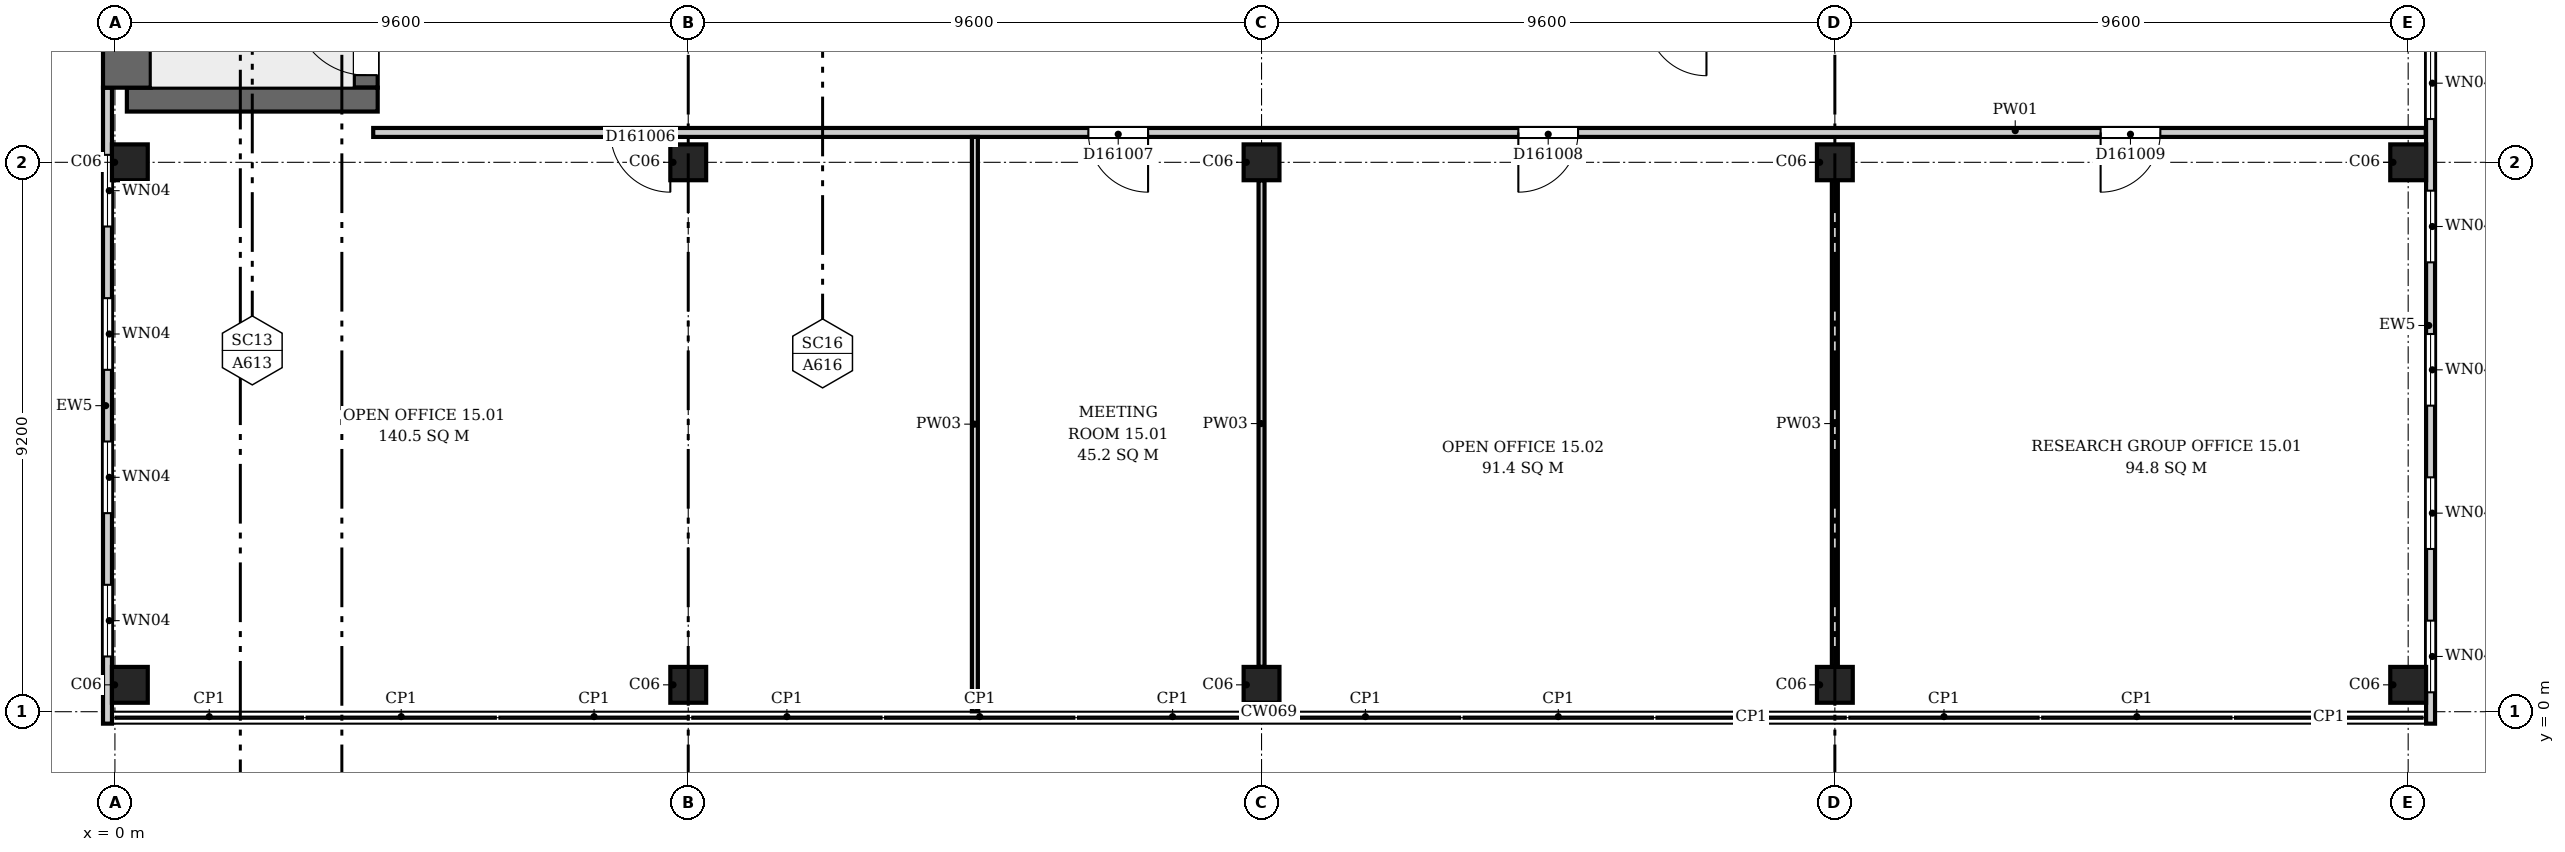
"""IFC4 building model, lengths in metres.
Left out: names, types, materials, properties, quantities, classifications, styles, units other than length and angle.
Written with IfcOpenShell. Run it as: python <this file> out.ifc"""

import sys

from ifc_helpers import new_model, si_unit, direction, frame, frame_2d, origin, origin_2d, place, context, subcontext, project, spatial, rectangle, extrude, element, fill, save


model = new_model("IFC4")
c1 = context("Model", 3, precision=1e-05, world=origin(), true_north=direction((0.0, 1.0)))
c2 = subcontext(c1, "Body", "Model", "MODEL_VIEW")
j1 = project(units=[si_unit("LENGTHUNIT", "METRE"), si_unit("PLANEANGLEUNIT", "RADIAN")], contexts=[c1])
p1 = place(None, origin())
s1 = spatial("IfcSite", under=j1, at=p1, CompositionType="ELEMENT")
p2 = place(p1, origin())
s2 = spatial("IfcBuilding", under=s1, at=p2, CompositionType="ELEMENT")
p3 = place(p2, frame((0.0, 0.0, 73.9)))
s3 = spatial("IfcBuildingStorey", under=s2, at=p3, CompositionType="ELEMENT", Elevation=73.9)
p4 = place(p3, frame((0.2, 10.25, 0.0), z_axis=(0.0, 0.0, 1.0), x_axis=(1.0, 0.0, 0.0)))
e1 = element("IfcWall", 1, at=p4, inside=s3, PredefinedType="SHEAR", context=c2, shape_type="SweptSolid", body=[
    extrude(rectangle(XDim=4.2, YDim=0.4, at=frame_2d((2.1, 0.0))), origin(), (0.0, 0.0, 1.0), 4.2),
])
p5 = place(p3, frame((0.2, 10.45, 0.0), z_axis=(0.0, 0.0, 1.0), x_axis=(0.0, 1.0, 0.0)))
e2 = element("IfcWall", 2, at=p5, inside=s3, PredefinedType="SHEAR", context=c2, shape_type="SweptSolid", body=[
    extrude(rectangle(XDim=6.6, YDim=0.8, at=frame_2d((3.3, 0.0))), origin(), (0.0, 0.0, 1.0), 4.2),
])
p6 = place(p3, frame((4.2, 10.45, 0.0), z_axis=(0.0, 0.0, 1.0), x_axis=(0.0, 1.0, 0.0)))
e3 = element("IfcWall", 3, at=p6, inside=s3, PredefinedType="SHEAR", context=c2, shape_type="SweptSolid", body=[
    extrude(rectangle(XDim=6.6, YDim=0.4, at=frame_2d((3.3, 0.0))), origin(), (0.0, 0.0, 1.0), 4.2),
])
p7 = place(p6, frame((0.21, 0.0, 0.0)))
e4 = element("IfcOpeningElement", 4, at=p7, cuts=e3, PredefinedType="OPENING", context=c2, shape_type="SweptSolid", body=[
    extrude(rectangle(XDim=1.2, YDim=2.1, at=frame_2d((0.6, 1.05))), frame((0.0, 0.21, 0.0), z_axis=(0.0, -1.0, 0.0), x_axis=(1.0, 0.0, 0.0)), (0.0, 0.0, 1.0), 0.42),
])
for number, where, z_axis, x_axis in (
    (5, (0.25, 0.45, 0.0), (0.0, 0.0, 1.0), (1.0, 0.0, 0.0)),
    (6, (9.6, 0.45, 0.0), (0.0, 0.0, 1.0), (1.0, 0.0, 0.0)),
    (7, (19.2, 0.45, 0.0), (0.0, 0.0, 1.0), (1.0, 0.0, 0.0)),
    (8, (28.8, 0.45, 0.0), (0.0, 0.0, 1.0), (1.0, 0.0, 0.0)),
    (9, (38.4, 0.45, 0.0), (0.0, 0.0, 1.0), (1.0, 0.0, 0.0)),
    (10, (0.25, 9.2, 0.0), (0.0, 0.0, 1.0), (1.0, 0.0, 0.0)),
    (11, (9.6, 9.2, 0.0), (0.0, 0.0, 1.0), (1.0, 0.0, 0.0)),
    (12, (19.2, 9.2, 0.0), (0.0, 0.0, 1.0), (1.0, 0.0, 0.0)),
    (13, (28.8, 9.2, 0.0), (0.0, 0.0, 1.0), (1.0, 0.0, 0.0)),
    (14, (38.4, 9.2, 0.0), (0.0, 0.0, 1.0), (1.0, 0.0, 0.0)),
):
    element("IfcColumn", number, at=place(p3, frame(where, z_axis=z_axis, x_axis=x_axis)), inside=s3, PredefinedType="COLUMN", context=c2, shape_type="SweptSolid", body=[
        extrude(rectangle(XDim=0.6, YDim=0.6, at=origin_2d()), origin(), (0.0, 0.0, 1.0), 4.2),
    ])
p8 = place(p3, frame((-0.125, 10.45, 0.0), z_axis=(0.0, 0.0, 1.0), x_axis=(0.0, -1.0, 0.0)))
e15 = element("IfcWall", 15, at=p8, inside=s3, PredefinedType="ELEMENTEDWALL", context=c2, shape_type="SweptSolid", body=[
    extrude(rectangle(XDim=10.65, YDim=0.15, at=frame_2d((5.325, 0.0))), origin(), (0.0, 0.0, 1.0), 3.9),
])
p9 = place(p8, frame((8.325, 0.0, 0.9)))
e16 = element("IfcOpeningElement", 16, at=p9, cuts=e15, PredefinedType="OPENING", context=c2, shape_type="SweptSolid", body=[
    extrude(rectangle(XDim=1.2, YDim=2.6, at=frame_2d((0.6, 1.3))), frame((0.0, 0.085, 0.0), z_axis=(0.0, -1.0, 0.0), x_axis=(1.0, 0.0, 0.0)), (0.0, 0.0, 1.0), 0.17),
])
p10 = place(p8, frame((5.925, 0.0, 0.9)))
e17 = element("IfcOpeningElement", 17, at=p10, cuts=e15, PredefinedType="OPENING", context=c2, shape_type="SweptSolid", body=[
    extrude(rectangle(XDim=1.2, YDim=2.6, at=frame_2d((0.6, 1.3))), frame((0.0, 0.085, 0.0), z_axis=(0.0, -1.0, 0.0), x_axis=(1.0, 0.0, 0.0)), (0.0, 0.0, 1.0), 0.17),
])
p11 = place(p8, frame((3.525, 0.0, 0.9)))
e18 = element("IfcOpeningElement", 18, at=p11, cuts=e15, PredefinedType="OPENING", context=c2, shape_type="SweptSolid", body=[
    extrude(rectangle(XDim=1.2, YDim=2.6, at=frame_2d((0.6, 1.3))), frame((0.0, 0.085, 0.0), z_axis=(0.0, -1.0, 0.0), x_axis=(1.0, 0.0, 0.0)), (0.0, 0.0, 1.0), 0.17),
])
p12 = place(p8, frame((1.125, 0.0, 0.9)))
e19 = element("IfcOpeningElement", 19, at=p12, cuts=e15, PredefinedType="OPENING", context=c2, shape_type="SweptSolid", body=[
    extrude(rectangle(XDim=1.2, YDim=2.6, at=frame_2d((0.6, 1.3))), frame((0.0, 0.085, 0.0), z_axis=(0.0, -1.0, 0.0), x_axis=(1.0, 0.0, 0.0)), (0.0, 0.0, 1.0), 0.17),
])
p13 = place(p3, frame((38.775, -0.2, 0.0), z_axis=(0.0, 0.0, 1.0), x_axis=(0.0, 1.0, 0.0)))
e20 = element("IfcWall", 20, at=p13, inside=s3, PredefinedType="ELEMENTEDWALL", context=c2, shape_type="SweptSolid", body=[
    extrude(rectangle(XDim=19.05, YDim=0.15, at=frame_2d((9.525, 0.0))), origin(), (0.0, 0.0, 1.0), 3.9),
])
p14 = place(p13, frame((0.525, 0.0, 0.9)))
e21 = element("IfcOpeningElement", 21, at=p14, cuts=e20, PredefinedType="OPENING", context=c2, shape_type="SweptSolid", body=[
    extrude(rectangle(XDim=1.2, YDim=2.6, at=frame_2d((0.6, 1.3))), frame((0.0, 0.085, 0.0), z_axis=(0.0, -1.0, 0.0), x_axis=(1.0, 0.0, 0.0)), (0.0, 0.0, 1.0), 0.17),
])
p15 = place(p13, frame((2.925, 0.0, 0.9)))
e22 = element("IfcOpeningElement", 22, at=p15, cuts=e20, PredefinedType="OPENING", context=c2, shape_type="SweptSolid", body=[
    extrude(rectangle(XDim=1.2, YDim=2.6, at=frame_2d((0.6, 1.3))), frame((0.0, 0.085, 0.0), z_axis=(0.0, -1.0, 0.0), x_axis=(1.0, 0.0, 0.0)), (0.0, 0.0, 1.0), 0.17),
])
p16 = place(p13, frame((5.325, 0.0, 0.9)))
e23 = element("IfcOpeningElement", 23, at=p16, cuts=e20, PredefinedType="OPENING", context=c2, shape_type="SweptSolid", body=[
    extrude(rectangle(XDim=1.2, YDim=2.6, at=frame_2d((0.6, 1.3))), frame((0.0, 0.085, 0.0), z_axis=(0.0, -1.0, 0.0), x_axis=(1.0, 0.0, 0.0)), (0.0, 0.0, 1.0), 0.17),
])
p17 = place(p13, frame((7.725, 0.0, 0.9)))
e24 = element("IfcOpeningElement", 24, at=p17, cuts=e20, PredefinedType="OPENING", context=c2, shape_type="SweptSolid", body=[
    extrude(rectangle(XDim=1.2, YDim=2.6, at=frame_2d((0.6, 1.3))), frame((0.0, 0.085, 0.0), z_axis=(0.0, -1.0, 0.0), x_axis=(1.0, 0.0, 0.0)), (0.0, 0.0, 1.0), 0.17),
])
p18 = place(p13, frame((10.125, 0.0, 0.9)))
e25 = element("IfcOpeningElement", 25, at=p18, cuts=e20, PredefinedType="OPENING", context=c2, shape_type="SweptSolid", body=[
    extrude(rectangle(XDim=1.2, YDim=2.6, at=frame_2d((0.6, 1.3))), frame((0.0, 0.085, 0.0), z_axis=(0.0, -1.0, 0.0), x_axis=(1.0, 0.0, 0.0)), (0.0, 0.0, 1.0), 0.17),
])
p19 = place(p13, frame((12.525, 0.0, 0.9)))
e26 = element("IfcOpeningElement", 26, at=p19, cuts=e20, PredefinedType="OPENING", context=c2, shape_type="SweptSolid", body=[
    extrude(rectangle(XDim=1.2, YDim=2.6, at=frame_2d((0.6, 1.3))), frame((0.0, 0.085, 0.0), z_axis=(0.0, -1.0, 0.0), x_axis=(1.0, 0.0, 0.0)), (0.0, 0.0, 1.0), 0.17),
])
p20 = place(p13, frame((14.925, 0.0, 0.9)))
e27 = element("IfcOpeningElement", 27, at=p20, cuts=e20, PredefinedType="OPENING", context=c2, shape_type="SweptSolid", body=[
    extrude(rectangle(XDim=1.2, YDim=2.6, at=frame_2d((0.6, 1.3))), frame((0.0, 0.085, 0.0), z_axis=(0.0, -1.0, 0.0), x_axis=(1.0, 0.0, 0.0)), (0.0, 0.0, 1.0), 0.17),
])
p21 = place(p13, frame((17.325, 0.0, 0.9)))
e28 = element("IfcOpeningElement", 28, at=p21, cuts=e20, PredefinedType="OPENING", context=c2, shape_type="SweptSolid", body=[
    extrude(rectangle(XDim=1.2, YDim=2.6, at=frame_2d((0.6, 1.3))), frame((0.0, 0.085, 0.0), z_axis=(0.0, -1.0, 0.0), x_axis=(1.0, 0.0, 0.0)), (0.0, 0.0, 1.0), 0.17),
])
p22 = place(p3, frame((4.325, 9.7, 0.0), z_axis=(0.0, 0.0, 1.0), x_axis=(1.0, 0.0, 0.0)))
e29 = element("IfcWall", 29, at=p22, inside=s3, PredefinedType="PARTITIONING", context=c2, shape_type="SweptSolid", body=[
    extrude(rectangle(XDim=34.369, YDim=0.15, at=frame_2d((17.185, 0.0))), origin(), (0.0, 0.0, 1.0), 3.9),
])
p23 = place(p22, frame((3.975, 0.0, 0.0)))
e30 = element("IfcOpeningElement", 30, at=p23, cuts=e29, PredefinedType="OPENING", context=c2, shape_type="SweptSolid", body=[
    extrude(rectangle(XDim=1.0, YDim=2.1, at=frame_2d((0.5, 1.05))), frame((0.0, 0.085, 0.0), z_axis=(0.0, -1.0, 0.0), x_axis=(1.0, 0.0, 0.0)), (0.0, 0.0, 1.0), 0.17),
])
p24 = place(p22, frame((11.975, 0.0, 0.0)))
e31 = element("IfcOpeningElement", 31, at=p24, cuts=e29, PredefinedType="OPENING", context=c2, shape_type="SweptSolid", body=[
    extrude(rectangle(XDim=1.0, YDim=2.1, at=frame_2d((0.5, 1.05))), frame((0.0, 0.085, 0.0), z_axis=(0.0, -1.0, 0.0), x_axis=(1.0, 0.0, 0.0)), (0.0, 0.0, 1.0), 0.17),
])
p25 = place(p22, frame((19.175, 0.0, 0.0)))
e32 = element("IfcOpeningElement", 32, at=p25, cuts=e29, PredefinedType="OPENING", context=c2, shape_type="SweptSolid", body=[
    extrude(rectangle(XDim=1.0, YDim=2.1, at=frame_2d((0.5, 1.05))), frame((0.0, 0.085, 0.0), z_axis=(0.0, -1.0, 0.0), x_axis=(1.0, 0.0, 0.0)), (0.0, 0.0, 1.0), 0.17),
])
p26 = place(p22, frame((28.925, 0.0, 0.0)))
e33 = element("IfcOpeningElement", 33, at=p26, cuts=e29, PredefinedType="OPENING", context=c2, shape_type="SweptSolid", body=[
    extrude(rectangle(XDim=1.0, YDim=2.1, at=frame_2d((0.5, 1.05))), frame((0.0, 0.085, 0.0), z_axis=(0.0, -1.0, 0.0), x_axis=(1.0, 0.0, 0.0)), (0.0, 0.0, 1.0), 0.17),
])
p27 = place(p3, frame((14.4, 0.006, 0.0), z_axis=(0.0, 0.0, 1.0), x_axis=(0.0, 1.0, 0.0)))
e34 = element("IfcWall", 34, at=p27, inside=s3, PredefinedType="PARTITIONING", context=c2, shape_type="SweptSolid", body=[
    extrude(rectangle(XDim=9.619, YDim=0.1, at=frame_2d((4.81, 0.0))), origin(), (0.0, 0.0, 1.0), 3.9),
])
for number, where, z_axis, x_axis in (
    (35, (19.2, 0.75, 0.0), (0.0, 0.0, 1.0), (0.0, 1.0, 0.0)),
    (36, (28.8, 0.75, 0.0), (0.0, 0.0, 1.0), (0.0, 1.0, 0.0)),
):
    element("IfcWall", number, at=place(p3, frame(where, z_axis=z_axis, x_axis=x_axis)), inside=s3, PredefinedType="PARTITIONING", context=c2, shape_type="SweptSolid", body=[
        extrude(rectangle(XDim=8.15, YDim=0.1, at=frame_2d((4.075, 0.0))), origin(), (0.0, 0.0, 1.0), 3.9),
    ])
p28 = place(p9, origin())
e37 = element("IfcWindow", 37, at=p28, inside=s3, PartitioningType="SINGLE_PANEL", PredefinedType="WINDOW", context=c2, shape_type="SweptSolid", body=[
    extrude(rectangle(XDim=1.2, YDim=2.6, at=frame_2d((0.6, 1.3))), frame((0.0, 0.03, 0.0), z_axis=(0.0, -1.0, 0.0), x_axis=(1.0, 0.0, 0.0)), (0.0, 0.0, 1.0), 0.06),
])
fill(e16, e37)
p29 = place(p10, origin())
e38 = element("IfcWindow", 38, at=p29, inside=s3, PartitioningType="SINGLE_PANEL", PredefinedType="WINDOW", context=c2, shape_type="SweptSolid", body=[
    extrude(rectangle(XDim=1.2, YDim=2.6, at=frame_2d((0.6, 1.3))), frame((0.0, 0.03, 0.0), z_axis=(0.0, -1.0, 0.0), x_axis=(1.0, 0.0, 0.0)), (0.0, 0.0, 1.0), 0.06),
])
fill(e17, e38)
p30 = place(p11, origin())
e39 = element("IfcWindow", 39, at=p30, inside=s3, PartitioningType="SINGLE_PANEL", PredefinedType="WINDOW", context=c2, shape_type="SweptSolid", body=[
    extrude(rectangle(XDim=1.2, YDim=2.6, at=frame_2d((0.6, 1.3))), frame((0.0, 0.03, 0.0), z_axis=(0.0, -1.0, 0.0), x_axis=(1.0, 0.0, 0.0)), (0.0, 0.0, 1.0), 0.06),
])
fill(e18, e39)
p31 = place(p12, origin())
e40 = element("IfcWindow", 40, at=p31, inside=s3, PartitioningType="SINGLE_PANEL", PredefinedType="WINDOW", context=c2, shape_type="SweptSolid", body=[
    extrude(rectangle(XDim=1.2, YDim=2.6, at=frame_2d((0.6, 1.3))), frame((0.0, 0.03, 0.0), z_axis=(0.0, -1.0, 0.0), x_axis=(1.0, 0.0, 0.0)), (0.0, 0.0, 1.0), 0.06),
])
fill(e19, e40)
p32 = place(p14, origin())
e41 = element("IfcWindow", 41, at=p32, inside=s3, PartitioningType="SINGLE_PANEL", PredefinedType="WINDOW", context=c2, shape_type="SweptSolid", body=[
    extrude(rectangle(XDim=1.2, YDim=2.6, at=frame_2d((0.6, 1.3))), frame((0.0, 0.03, 0.0), z_axis=(0.0, -1.0, 0.0), x_axis=(1.0, 0.0, 0.0)), (0.0, 0.0, 1.0), 0.06),
])
fill(e21, e41)
p33 = place(p15, origin())
e42 = element("IfcWindow", 42, at=p33, inside=s3, PartitioningType="SINGLE_PANEL", PredefinedType="WINDOW", context=c2, shape_type="SweptSolid", body=[
    extrude(rectangle(XDim=1.2, YDim=2.6, at=frame_2d((0.6, 1.3))), frame((0.0, 0.03, 0.0), z_axis=(0.0, -1.0, 0.0), x_axis=(1.0, 0.0, 0.0)), (0.0, 0.0, 1.0), 0.06),
])
fill(e22, e42)
p34 = place(p16, origin())
e43 = element("IfcWindow", 43, at=p34, inside=s3, PartitioningType="SINGLE_PANEL", PredefinedType="WINDOW", context=c2, shape_type="SweptSolid", body=[
    extrude(rectangle(XDim=1.2, YDim=2.6, at=frame_2d((0.6, 1.3))), frame((0.0, 0.03, 0.0), z_axis=(0.0, -1.0, 0.0), x_axis=(1.0, 0.0, 0.0)), (0.0, 0.0, 1.0), 0.06),
])
fill(e23, e43)
p35 = place(p17, origin())
e44 = element("IfcWindow", 44, at=p35, inside=s3, PartitioningType="SINGLE_PANEL", PredefinedType="WINDOW", context=c2, shape_type="SweptSolid", body=[
    extrude(rectangle(XDim=1.2, YDim=2.6, at=frame_2d((0.6, 1.3))), frame((0.0, 0.03, 0.0), z_axis=(0.0, -1.0, 0.0), x_axis=(1.0, 0.0, 0.0)), (0.0, 0.0, 1.0), 0.06),
])
fill(e24, e44)
p36 = place(p18, origin())
e45 = element("IfcWindow", 45, at=p36, inside=s3, PartitioningType="SINGLE_PANEL", PredefinedType="WINDOW", context=c2, shape_type="SweptSolid", body=[
    extrude(rectangle(XDim=1.2, YDim=2.6, at=frame_2d((0.6, 1.3))), frame((0.0, 0.03, 0.0), z_axis=(0.0, -1.0, 0.0), x_axis=(1.0, 0.0, 0.0)), (0.0, 0.0, 1.0), 0.06),
])
fill(e25, e45)
p37 = place(p7, origin())
e46 = element("IfcDoor", 46, at=p37, inside=s3, OperationType="SINGLE_SWING_RIGHT", PredefinedType="DOOR", context=c2, shape_type="SweptSolid", body=[
    extrude(rectangle(XDim=1.2, YDim=2.1, at=frame_2d((0.6, 1.05))), frame((0.0, 0.025, 0.0), z_axis=(0.0, -1.0, 0.0), x_axis=(1.0, 0.0, 0.0)), (0.0, 0.0, 1.0), 0.05),
])
fill(e4, e46)
p38 = place(p23, origin())
e47 = element("IfcDoor", 47, at=p38, inside=s3, OperationType="SINGLE_SWING_RIGHT", PredefinedType="DOOR", context=c2, shape_type="SweptSolid", body=[
    extrude(rectangle(XDim=1.0, YDim=2.1, at=frame_2d((0.5, 1.05))), frame((0.0, 0.025, 0.0), z_axis=(0.0, -1.0, 0.0), x_axis=(1.0, 0.0, 0.0)), (0.0, 0.0, 1.0), 0.05),
])
fill(e30, e47)
p39 = place(p24, origin())
e48 = element("IfcDoor", 48, at=p39, inside=s3, OperationType="SINGLE_SWING_RIGHT", PredefinedType="DOOR", context=c2, shape_type="SweptSolid", body=[
    extrude(rectangle(XDim=1.0, YDim=2.1, at=frame_2d((0.5, 1.05))), frame((0.0, 0.025, 0.0), z_axis=(0.0, -1.0, 0.0), x_axis=(1.0, 0.0, 0.0)), (0.0, 0.0, 1.0), 0.05),
])
fill(e31, e48)
p40 = place(p25, origin())
e49 = element("IfcDoor", 49, at=p40, inside=s3, OperationType="SINGLE_SWING_LEFT", PredefinedType="DOOR", context=c2, shape_type="SweptSolid", body=[
    extrude(rectangle(XDim=1.0, YDim=2.1, at=frame_2d((0.5, 1.05))), frame((0.0, 0.025, 0.0), z_axis=(0.0, -1.0, 0.0), x_axis=(1.0, 0.0, 0.0)), (0.0, 0.0, 1.0), 0.05),
])
fill(e32, e49)
p41 = place(p26, origin())
e50 = element("IfcDoor", 50, at=p41, inside=s3, OperationType="SINGLE_SWING_LEFT", PredefinedType="DOOR", context=c2, shape_type="SweptSolid", body=[
    extrude(rectangle(XDim=1.0, YDim=2.1, at=frame_2d((0.5, 1.05))), frame((0.0, 0.025, 0.0), z_axis=(0.0, -1.0, 0.0), x_axis=(1.0, 0.0, 0.0)), (0.0, 0.0, 1.0), 0.05),
])
fill(e33, e50)
save(model, sys.argv[1])
